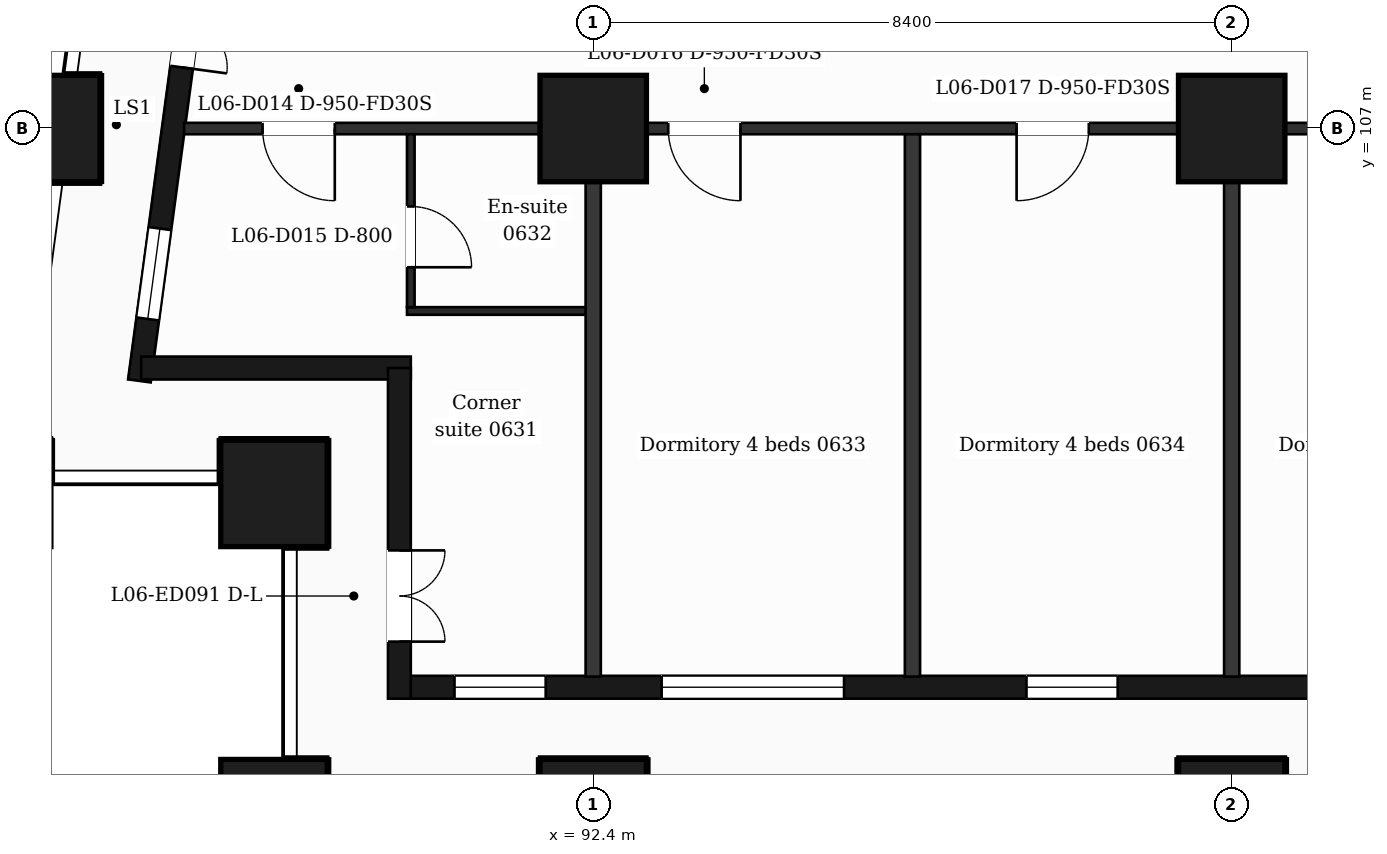
"""IFC4 building model, lengths in metres.
Left out: names, types, materials, properties, quantities, classifications, styles, units other than length and angle.
Written with IfcOpenShell. Run it as: python <this file> out.ifc"""

import sys

from ifc_helpers import new_model, si_unit, direction, frame, frame_2d, origin, origin_2d, place, context, subcontext, project, spatial, rectangle, extrude, element, fill, save


model = new_model("IFC4")
c1 = context("Model", 3, precision=1e-05, world=origin(), true_north=direction((0.0, 1.0)))
c2 = subcontext(c1, "Body", "Model", "MODEL_VIEW")
j1 = project(units=[si_unit("LENGTHUNIT", "METRE"), si_unit("PLANEANGLEUNIT", "RADIAN")], contexts=[c1])
p1 = place(None, origin())
s1 = spatial("IfcSite", under=j1, at=p1, CompositionType="ELEMENT")
p2 = place(p1, origin())
s2 = spatial("IfcBuilding", under=s1, at=p2, CompositionType="ELEMENT")
p3 = place(p2, frame((0.0, 0.0, 39.0)))
s3 = spatial("IfcBuildingStorey", under=s2, at=p3, CompositionType="ELEMENT", Elevation=39.0)
for number, where, z_axis, x_axis in (
    (1, (92.4, 98.0, -0.32), (0.0, 0.0, 1.0), (1.0, 0.0, 0.0)),
    (2, (100.8, 98.0, -0.32), (0.0, 0.0, 1.0), (1.0, 0.0, 0.0)),
    (3, (88.2, 98.0, -0.32), (0.0, 0.0, 1.0), (1.0, 0.0, 0.0)),
    (4, (88.2, 102.2, -0.32), (0.0, 0.0, 1.0), (1.0, 0.0, 0.0)),
    (5, (92.4, 107.0, -0.32), (0.0, 0.0, 1.0), (1.0, 0.0, 0.0)),
    (6, (100.8, 107.0, -0.32), (0.0, 0.0, 1.0), (1.0, 0.0, 0.0)),
    (7, (85.211, 107.0, -0.32), (0.0, 0.0, 1.0), (1.0, 0.0, 0.0)),
):
    element("IfcColumn", number, at=place(p3, frame(where, z_axis=z_axis, x_axis=x_axis)), inside=s3, PredefinedType="COLUMN", context=c2, shape_type="SweptSolid", body=[
        extrude(rectangle(XDim=1.4, YDim=1.4, at=origin_2d()), origin(), (0.0, 0.0, 1.0), 3.82),
    ])
p4 = place(p3, frame((89.85, 99.65, 0.0), z_axis=(0.0, 0.0, 1.0), x_axis=(1.0, 0.0, 0.0)))
e8 = element("IfcWall", 8, at=p4, inside=s3, PredefinedType="SOLIDWALL", context=c2, shape_type="SweptSolid", body=[
    extrude(rectangle(XDim=47.25, YDim=0.3, at=frame_2d((23.625, 0.0))), origin(), (0.0, 0.0, 1.0), 3.18),
])
p5 = place(p4, frame((0.725, 0.0, 0.9)))
e9 = element("IfcOpeningElement", 9, at=p5, cuts=e8, PredefinedType="OPENING", context=c2, shape_type="SweptSolid", body=[
    extrude(rectangle(XDim=1.2, YDim=2.1, at=frame_2d((0.6, 1.05))), frame((0.0, 0.16, 0.0), z_axis=(0.0, -1.0, 0.0), x_axis=(1.0, 0.0, 0.0)), (0.0, 0.0, 1.0), 0.32),
])
p6 = place(p4, frame((3.45, 0.0, 0.9)))
e10 = element("IfcOpeningElement", 10, at=p6, cuts=e8, PredefinedType="OPENING", context=c2, shape_type="SweptSolid", body=[
    extrude(rectangle(XDim=2.4, YDim=2.1, at=frame_2d((1.2, 1.05))), frame((0.0, 0.16, 0.0), z_axis=(0.0, -1.0, 0.0), x_axis=(1.0, 0.0, 0.0)), (0.0, 0.0, 1.0), 0.32),
])
p7 = place(p4, frame((8.25, 0.0, 0.9)))
e11 = element("IfcOpeningElement", 11, at=p7, cuts=e8, PredefinedType="OPENING", context=c2, shape_type="SweptSolid", body=[
    extrude(rectangle(XDim=1.2, YDim=2.1, at=frame_2d((0.6, 1.05))), frame((0.0, 0.16, 0.0), z_axis=(0.0, -1.0, 0.0), x_axis=(1.0, 0.0, 0.0)), (0.0, 0.0, 1.0), 0.32),
])
p8 = place(p4, frame((12.45, 0.0, 0.9)))
e12 = element("IfcOpeningElement", 12, at=p8, cuts=e8, PredefinedType="OPENING", context=c2, shape_type="SweptSolid", body=[
    extrude(rectangle(XDim=1.2, YDim=2.1, at=frame_2d((0.6, 1.05))), frame((0.0, 0.16, 0.0), z_axis=(0.0, -1.0, 0.0), x_axis=(1.0, 0.0, 0.0)), (0.0, 0.0, 1.0), 0.32),
])
p9 = place(p4, frame((16.05, 0.0, 0.9)))
e13 = element("IfcOpeningElement", 13, at=p9, cuts=e8, PredefinedType="OPENING", context=c2, shape_type="SweptSolid", body=[
    extrude(rectangle(XDim=2.4, YDim=2.1, at=frame_2d((1.2, 1.05))), frame((0.0, 0.16, 0.0), z_axis=(0.0, -1.0, 0.0), x_axis=(1.0, 0.0, 0.0)), (0.0, 0.0, 1.0), 0.32),
])
p10 = place(p4, frame((20.25, 0.0, 0.9)))
e14 = element("IfcOpeningElement", 14, at=p10, cuts=e8, PredefinedType="OPENING", context=c2, shape_type="SweptSolid", body=[
    extrude(rectangle(XDim=2.4, YDim=2.1, at=frame_2d((1.2, 1.05))), frame((0.0, 0.16, 0.0), z_axis=(0.0, -1.0, 0.0), x_axis=(1.0, 0.0, 0.0)), (0.0, 0.0, 1.0), 0.32),
])
p11 = place(p4, frame((25.05, 0.0, 0.0)))
e15 = element("IfcOpeningElement", 15, at=p11, cuts=e8, PredefinedType="OPENING", context=c2, shape_type="SweptSolid", body=[
    extrude(rectangle(XDim=1.2, YDim=2.4, at=frame_2d((0.6, 1.2))), frame((0.0, 0.16, 0.0), z_axis=(0.0, -1.0, 0.0), x_axis=(1.0, 0.0, 0.0)), (0.0, 0.0, 1.0), 0.32),
])
p12 = place(p4, frame((28.65, 0.0, 0.9)))
e16 = element("IfcOpeningElement", 16, at=p12, cuts=e8, PredefinedType="OPENING", context=c2, shape_type="SweptSolid", body=[
    extrude(rectangle(XDim=2.4, YDim=2.1, at=frame_2d((1.2, 1.05))), frame((0.0, 0.16, 0.0), z_axis=(0.0, -1.0, 0.0), x_axis=(1.0, 0.0, 0.0)), (0.0, 0.0, 1.0), 0.32),
])
p13 = place(p4, frame((32.85, 0.0, 0.9)))
e17 = element("IfcOpeningElement", 17, at=p13, cuts=e8, PredefinedType="OPENING", context=c2, shape_type="SweptSolid", body=[
    extrude(rectangle(XDim=2.4, YDim=2.1, at=frame_2d((1.2, 1.05))), frame((0.0, 0.16, 0.0), z_axis=(0.0, -1.0, 0.0), x_axis=(1.0, 0.0, 0.0)), (0.0, 0.0, 1.0), 0.32),
])
p14 = place(p4, frame((37.65, 0.0, 0.9)))
e18 = element("IfcOpeningElement", 18, at=p14, cuts=e8, PredefinedType="OPENING", context=c2, shape_type="SweptSolid", body=[
    extrude(rectangle(XDim=1.2, YDim=2.1, at=frame_2d((0.6, 1.05))), frame((0.0, 0.16, 0.0), z_axis=(0.0, -1.0, 0.0), x_axis=(1.0, 0.0, 0.0)), (0.0, 0.0, 1.0), 0.32),
])
p15 = place(p4, frame((41.85, 0.0, 0.9)))
e19 = element("IfcOpeningElement", 19, at=p15, cuts=e8, PredefinedType="OPENING", context=c2, shape_type="SweptSolid", body=[
    extrude(rectangle(XDim=1.2, YDim=2.1, at=frame_2d((0.6, 1.05))), frame((0.0, 0.16, 0.0), z_axis=(0.0, -1.0, 0.0), x_axis=(1.0, 0.0, 0.0)), (0.0, 0.0, 1.0), 0.32),
])
p16 = place(p4, frame((45.25, 0.0, 0.9)))
e20 = element("IfcOpeningElement", 20, at=p16, cuts=e8, PredefinedType="OPENING", context=c2, shape_type="SweptSolid", body=[
    extrude(rectangle(XDim=1.2, YDim=2.1, at=frame_2d((0.6, 1.05))), frame((0.0, 0.16, 0.0), z_axis=(0.0, -1.0, 0.0), x_axis=(1.0, 0.0, 0.0)), (0.0, 0.0, 1.0), 0.32),
])
p17 = place(p3, frame((87.334, 110.4, 0.0), z_axis=(0.0, 0.0, 1.0), x_axis=(-0.133437175554, -0.991057273915, 0.0)))
e21 = element("IfcWall", 21, at=p17, inside=s3, PredefinedType="SOLIDWALL", context=c2, shape_type="SweptSolid", body=[
    extrude(rectangle(XDim=6.781, YDim=0.3, at=frame_2d((3.39, 0.0))), origin(), (0.0, 0.0, 1.0), 3.18),
])
p18 = place(p17, frame((1.418, 0.0, 0.0)))
e22 = element("IfcOpeningElement", 22, at=p18, cuts=e21, PredefinedType="OPENING", context=c2, shape_type="SweptSolid", body=[
    extrude(rectangle(XDim=1.2, YDim=2.4, at=frame_2d((0.6, 1.2))), frame((0.0, 0.16, 0.0), z_axis=(0.0, -1.0, 0.0), x_axis=(1.0, 0.0, 0.0)), (0.0, 0.0, 1.0), 0.32),
])
p19 = place(p17, frame((4.758, 0.0, 0.9)))
e23 = element("IfcOpeningElement", 23, at=p19, cuts=e21, PredefinedType="OPENING", context=c2, shape_type="SweptSolid", body=[
    extrude(rectangle(XDim=1.2, YDim=2.1, at=frame_2d((0.6, 1.05))), frame((0.0, 0.16, 0.0), z_axis=(0.0, -1.0, 0.0), x_axis=(1.0, 0.0, 0.0)), (0.0, 0.0, 1.0), 0.32),
])
p20 = place(p3, frame((86.452, 103.85, 0.0), z_axis=(0.0, 0.0, 1.0), x_axis=(1.0, 0.0, 0.0)))
e24 = element("IfcWall", 24, at=p20, inside=s3, PredefinedType="SOLIDWALL", context=c2, shape_type="SweptSolid", body=[
    extrude(rectangle(XDim=3.548, YDim=0.3, at=frame_2d((1.774, 0.0))), origin(), (0.0, 0.0, 1.0), 3.18),
])
p21 = place(p3, frame((89.85, 103.85, 0.0), z_axis=(0.0, 0.0, 1.0), x_axis=(0.0, -1.0, 0.0)))
e25 = element("IfcWall", 25, at=p21, inside=s3, PredefinedType="SOLIDWALL", context=c2, shape_type="SweptSolid", body=[
    extrude(rectangle(XDim=4.35, YDim=0.3, at=frame_2d((2.175, 0.0))), origin(), (0.0, 0.0, 1.0), 3.18),
])
p22 = place(p21, frame((2.4, 0.0, 0.0)))
e26 = element("IfcOpeningElement", 26, at=p22, cuts=e25, PredefinedType="OPENING", context=c2, shape_type="SweptSolid", body=[
    extrude(rectangle(XDim=1.2, YDim=2.4, at=frame_2d((0.6, 1.2))), frame((0.0, 0.16, 0.0), z_axis=(0.0, -1.0, 0.0), x_axis=(1.0, 0.0, 0.0)), (0.0, 0.0, 1.0), 0.32),
])
p23 = place(p3, frame((89.95, 104.6, 0.0), z_axis=(0.0, 0.0, 1.0), x_axis=(1.0, 0.0, 0.0)))
e27 = element("IfcWall", 27, at=p23, inside=s3, PredefinedType="PARTITIONING", context=c2, shape_type="SweptSolid", body=[
    extrude(rectangle(XDim=2.45, YDim=0.1, at=frame_2d((1.225, 0.0))), origin(), (0.0, 0.0, 1.0), 3.18),
])
p24 = place(p3, frame((87.018, 107.0, 0.0), z_axis=(0.0, 0.0, 1.0), x_axis=(1.0, 0.0, 0.0)))
e28 = element("IfcWall", 28, at=p24, inside=s3, PredefinedType="PARTITIONING", context=c2, shape_type="SweptSolid", body=[
    extrude(rectangle(XDim=52.765, YDim=0.15, at=frame_2d((26.382, 0.0))), origin(), (0.0, 0.0, 1.0), 3.18),
])
p25 = place(p24, frame((1.032, 0.0, 0.0)))
e29 = element("IfcOpeningElement", 29, at=p25, cuts=e28, PredefinedType="OPENING", context=c2, shape_type="SweptSolid", body=[
    extrude(rectangle(XDim=0.95, YDim=2.1, at=frame_2d((0.475, 1.05))), frame((0.0, 0.085, 0.0), z_axis=(0.0, -1.0, 0.0), x_axis=(1.0, 0.0, 0.0)), (0.0, 0.0, 1.0), 0.17),
])
p26 = place(p24, frame((6.369, 0.0, 0.0)))
e30 = element("IfcOpeningElement", 30, at=p26, cuts=e28, PredefinedType="OPENING", context=c2, shape_type="SweptSolid", body=[
    extrude(rectangle(XDim=0.95, YDim=2.1, at=frame_2d((0.475, 1.05))), frame((0.0, 0.085, 0.0), z_axis=(0.0, -1.0, 0.0), x_axis=(1.0, 0.0, 0.0)), (0.0, 0.0, 1.0), 0.17),
])
p27 = place(p24, frame((10.952, 0.0, 0.0)))
e31 = element("IfcOpeningElement", 31, at=p27, cuts=e28, PredefinedType="OPENING", context=c2, shape_type="SweptSolid", body=[
    extrude(rectangle(XDim=0.95, YDim=2.1, at=frame_2d((0.475, 1.05))), frame((0.0, 0.085, 0.0), z_axis=(0.0, -1.0, 0.0), x_axis=(1.0, 0.0, 0.0)), (0.0, 0.0, 1.0), 0.17),
])
p28 = place(p24, frame((16.045, 0.0, 0.0)))
e32 = element("IfcOpeningElement", 32, at=p28, cuts=e28, PredefinedType="OPENING", context=c2, shape_type="SweptSolid", body=[
    extrude(rectangle(XDim=0.95, YDim=2.1, at=frame_2d((0.475, 1.05))), frame((0.0, 0.085, 0.0), z_axis=(0.0, -1.0, 0.0), x_axis=(1.0, 0.0, 0.0)), (0.0, 0.0, 1.0), 0.17),
])
p29 = place(p24, frame((20.245, 0.0, 0.0)))
e33 = element("IfcOpeningElement", 33, at=p29, cuts=e28, PredefinedType="OPENING", context=c2, shape_type="SweptSolid", body=[
    extrude(rectangle(XDim=0.95, YDim=2.1, at=frame_2d((0.475, 1.05))), frame((0.0, 0.085, 0.0), z_axis=(0.0, -1.0, 0.0), x_axis=(1.0, 0.0, 0.0)), (0.0, 0.0, 1.0), 0.17),
])
p30 = place(p24, frame((24.969, 0.0, 0.0)))
e34 = element("IfcOpeningElement", 34, at=p30, cuts=e28, PredefinedType="OPENING", context=c2, shape_type="SweptSolid", body=[
    extrude(rectangle(XDim=0.95, YDim=2.1, at=frame_2d((0.475, 1.05))), frame((0.0, 0.085, 0.0), z_axis=(0.0, -1.0, 0.0), x_axis=(1.0, 0.0, 0.0)), (0.0, 0.0, 1.0), 0.17),
])
p31 = place(p24, frame((26.807, 0.0, 0.0)))
e35 = element("IfcOpeningElement", 35, at=p31, cuts=e28, PredefinedType="OPENING", context=c2, shape_type="SweptSolid", body=[
    extrude(rectangle(XDim=0.95, YDim=2.1, at=frame_2d((0.475, 1.05))), frame((0.0, 0.085, 0.0), z_axis=(0.0, -1.0, 0.0), x_axis=(1.0, 0.0, 0.0)), (0.0, 0.0, 1.0), 0.17),
])
p32 = place(p24, frame((31.952, 0.0, 0.0)))
e36 = element("IfcOpeningElement", 36, at=p32, cuts=e28, PredefinedType="OPENING", context=c2, shape_type="SweptSolid", body=[
    extrude(rectangle(XDim=0.95, YDim=2.1, at=frame_2d((0.475, 1.05))), frame((0.0, 0.085, 0.0), z_axis=(0.0, -1.0, 0.0), x_axis=(1.0, 0.0, 0.0)), (0.0, 0.0, 1.0), 0.17),
])
p33 = place(p24, frame((40.795, 0.0, 0.0)))
e37 = element("IfcOpeningElement", 37, at=p33, cuts=e28, PredefinedType="OPENING", context=c2, shape_type="SweptSolid", body=[
    extrude(rectangle(XDim=0.95, YDim=2.1, at=frame_2d((0.475, 1.05))), frame((0.0, 0.085, 0.0), z_axis=(0.0, -1.0, 0.0), x_axis=(1.0, 0.0, 0.0)), (0.0, 0.0, 1.0), 0.17),
])
p34 = place(p24, frame((43.644, 0.0, 0.0)))
e38 = element("IfcOpeningElement", 38, at=p34, cuts=e28, PredefinedType="OPENING", context=c2, shape_type="SweptSolid", body=[
    extrude(rectangle(XDim=0.95, YDim=2.1, at=frame_2d((0.475, 1.05))), frame((0.0, 0.085, 0.0), z_axis=(0.0, -1.0, 0.0), x_axis=(1.0, 0.0, 0.0)), (0.0, 0.0, 1.0), 0.17),
])
p35 = place(p24, frame((48.767, 0.0, 0.0)))
e39 = element("IfcOpeningElement", 39, at=p35, cuts=e28, PredefinedType="OPENING", context=c2, shape_type="SweptSolid", body=[
    extrude(rectangle(XDim=0.95, YDim=2.1, at=frame_2d((0.475, 1.05))), frame((0.0, 0.085, 0.0), z_axis=(0.0, -1.0, 0.0), x_axis=(1.0, 0.0, 0.0)), (0.0, 0.0, 1.0), 0.17),
])
p36 = place(p3, frame((90.0, 104.65, 0.0), z_axis=(0.0, 0.0, 1.0), x_axis=(0.0, 1.0, 0.0)))
e40 = element("IfcWall", 40, at=p36, inside=s3, PredefinedType="PARTITIONING", context=c2, shape_type="SweptSolid", body=[
    extrude(rectangle(XDim=2.275, YDim=0.1, at=frame_2d((1.138, 0.0))), origin(), (0.0, 0.0, 1.0), 3.18),
])
p37 = place(p36, frame((0.525, 0.0, 0.0)))
e41 = element("IfcOpeningElement", 41, at=p37, cuts=e40, PredefinedType="OPENING", context=c2, shape_type="SweptSolid", body=[
    extrude(rectangle(XDim=0.8, YDim=2.1, at=frame_2d((0.4, 1.05))), frame((0.0, 0.06, 0.0), z_axis=(0.0, -1.0, 0.0), x_axis=(1.0, 0.0, 0.0)), (0.0, 0.0, 1.0), 0.12),
])
for number, where, z_axis, x_axis in (
    (42, (92.4, 99.79, 0.0), (0.0, 0.0, 1.0), (0.0, 1.0, 0.0)),
    (43, (96.6, 99.79, 0.0), (0.0, 0.0, 1.0), (0.0, 1.0, 0.0)),
    (44, (100.8, 99.79, 0.0), (0.0, 0.0, 1.0), (0.0, 1.0, 0.0)),
):
    element("IfcWall", number, at=place(p3, frame(where, z_axis=z_axis, x_axis=x_axis)), inside=s3, PredefinedType="PARTITIONING", context=c2, shape_type="SweptSolid", body=[
        extrude(rectangle(XDim=7.135, YDim=0.2, at=frame_2d((3.567, 0.0))), origin(), (0.0, 0.0, 1.0), 3.18),
    ])
p38 = place(p5, origin())
e45 = element("IfcWindow", 45, at=p38, inside=s3, PartitioningType="SINGLE_PANEL", PredefinedType="WINDOW", context=c2, shape_type="SweptSolid", body=[
    extrude(rectangle(XDim=1.2, YDim=2.1, at=frame_2d((0.6, 1.05))), frame((0.0, 0.03, 0.0), z_axis=(0.0, -1.0, 0.0), x_axis=(1.0, 0.0, 0.0)), (0.0, 0.0, 1.0), 0.06),
])
fill(e9, e45)
p39 = place(p6, origin())
e46 = element("IfcWindow", 46, at=p39, inside=s3, PartitioningType="SINGLE_PANEL", PredefinedType="WINDOW", context=c2, shape_type="SweptSolid", body=[
    extrude(rectangle(XDim=2.4, YDim=2.1, at=frame_2d((1.2, 1.05))), frame((0.0, 0.03, 0.0), z_axis=(0.0, -1.0, 0.0), x_axis=(1.0, 0.0, 0.0)), (0.0, 0.0, 1.0), 0.06),
])
fill(e10, e46)
p40 = place(p7, origin())
e47 = element("IfcWindow", 47, at=p40, inside=s3, PartitioningType="SINGLE_PANEL", PredefinedType="WINDOW", context=c2, shape_type="SweptSolid", body=[
    extrude(rectangle(XDim=1.2, YDim=2.1, at=frame_2d((0.6, 1.05))), frame((0.0, 0.03, 0.0), z_axis=(0.0, -1.0, 0.0), x_axis=(1.0, 0.0, 0.0)), (0.0, 0.0, 1.0), 0.06),
])
fill(e11, e47)
p41 = place(p18, origin())
e48 = element("IfcDoor", 48, at=p41, inside=s3, OperationType="DOUBLE_DOOR_SINGLE_SWING", PredefinedType="DOOR", context=c2, shape_type="SweptSolid", body=[
    extrude(rectangle(XDim=1.2, YDim=2.4, at=frame_2d((0.6, 1.2))), frame((0.0, 0.025, 0.0), z_axis=(0.0, -1.0, 0.0), x_axis=(1.0, 0.0, 0.0)), (0.0, 0.0, 1.0), 0.05),
])
fill(e22, e48)
p42 = place(p19, origin())
e49 = element("IfcWindow", 49, at=p42, inside=s3, PartitioningType="SINGLE_PANEL", PredefinedType="WINDOW", context=c2, shape_type="SweptSolid", body=[
    extrude(rectangle(XDim=1.2, YDim=2.1, at=frame_2d((0.6, 1.05))), frame((0.0, 0.03, 0.0), z_axis=(0.0, -1.0, 0.0), x_axis=(1.0, 0.0, 0.0)), (0.0, 0.0, 1.0), 0.06),
])
fill(e23, e49)
p43 = place(p22, origin())
e50 = element("IfcDoor", 50, at=p43, inside=s3, OperationType="DOUBLE_DOOR_SINGLE_SWING", PredefinedType="DOOR", context=c2, shape_type="SweptSolid", body=[
    extrude(rectangle(XDim=1.2, YDim=2.4, at=frame_2d((0.6, 1.2))), frame((0.0, 0.025, 0.0), z_axis=(0.0, -1.0, 0.0), x_axis=(1.0, 0.0, 0.0)), (0.0, 0.0, 1.0), 0.05),
])
fill(e26, e50)
p44 = place(p25, origin())
e51 = element("IfcDoor", 51, at=p44, inside=s3, OperationType="SINGLE_SWING_RIGHT", PredefinedType="DOOR", context=c2, shape_type="SweptSolid", body=[
    extrude(rectangle(XDim=0.95, YDim=2.1, at=frame_2d((0.475, 1.05))), frame((0.0, 0.025, 0.0), z_axis=(0.0, -1.0, 0.0), x_axis=(1.0, 0.0, 0.0)), (0.0, 0.0, 1.0), 0.05),
])
fill(e29, e51)
p45 = place(p37, origin())
e52 = element("IfcDoor", 52, at=p45, inside=s3, OperationType="SINGLE_SWING_LEFT", PredefinedType="DOOR", context=c2, shape_type="SweptSolid", body=[
    extrude(rectangle(XDim=0.8, YDim=2.1, at=frame_2d((0.4, 1.05))), frame((0.0, 0.025, 0.0), z_axis=(0.0, -1.0, 0.0), x_axis=(1.0, 0.0, 0.0)), (0.0, 0.0, 1.0), 0.05),
])
fill(e41, e52)
p46 = place(p26, origin())
e53 = element("IfcDoor", 53, at=p46, inside=s3, OperationType="SINGLE_SWING_RIGHT", PredefinedType="DOOR", context=c2, shape_type="SweptSolid", body=[
    extrude(rectangle(XDim=0.95, YDim=2.1, at=frame_2d((0.475, 1.05))), frame((0.0, 0.025, 0.0), z_axis=(0.0, -1.0, 0.0), x_axis=(1.0, 0.0, 0.0)), (0.0, 0.0, 1.0), 0.05),
])
fill(e30, e53)
p47 = place(p27, origin())
e54 = element("IfcDoor", 54, at=p47, inside=s3, OperationType="SINGLE_SWING_LEFT", PredefinedType="DOOR", context=c2, shape_type="SweptSolid", body=[
    extrude(rectangle(XDim=0.95, YDim=2.1, at=frame_2d((0.475, 1.05))), frame((0.0, 0.025, 0.0), z_axis=(0.0, -1.0, 0.0), x_axis=(1.0, 0.0, 0.0)), (0.0, 0.0, 1.0), 0.05),
])
fill(e31, e54)
save(model, sys.argv[1])
